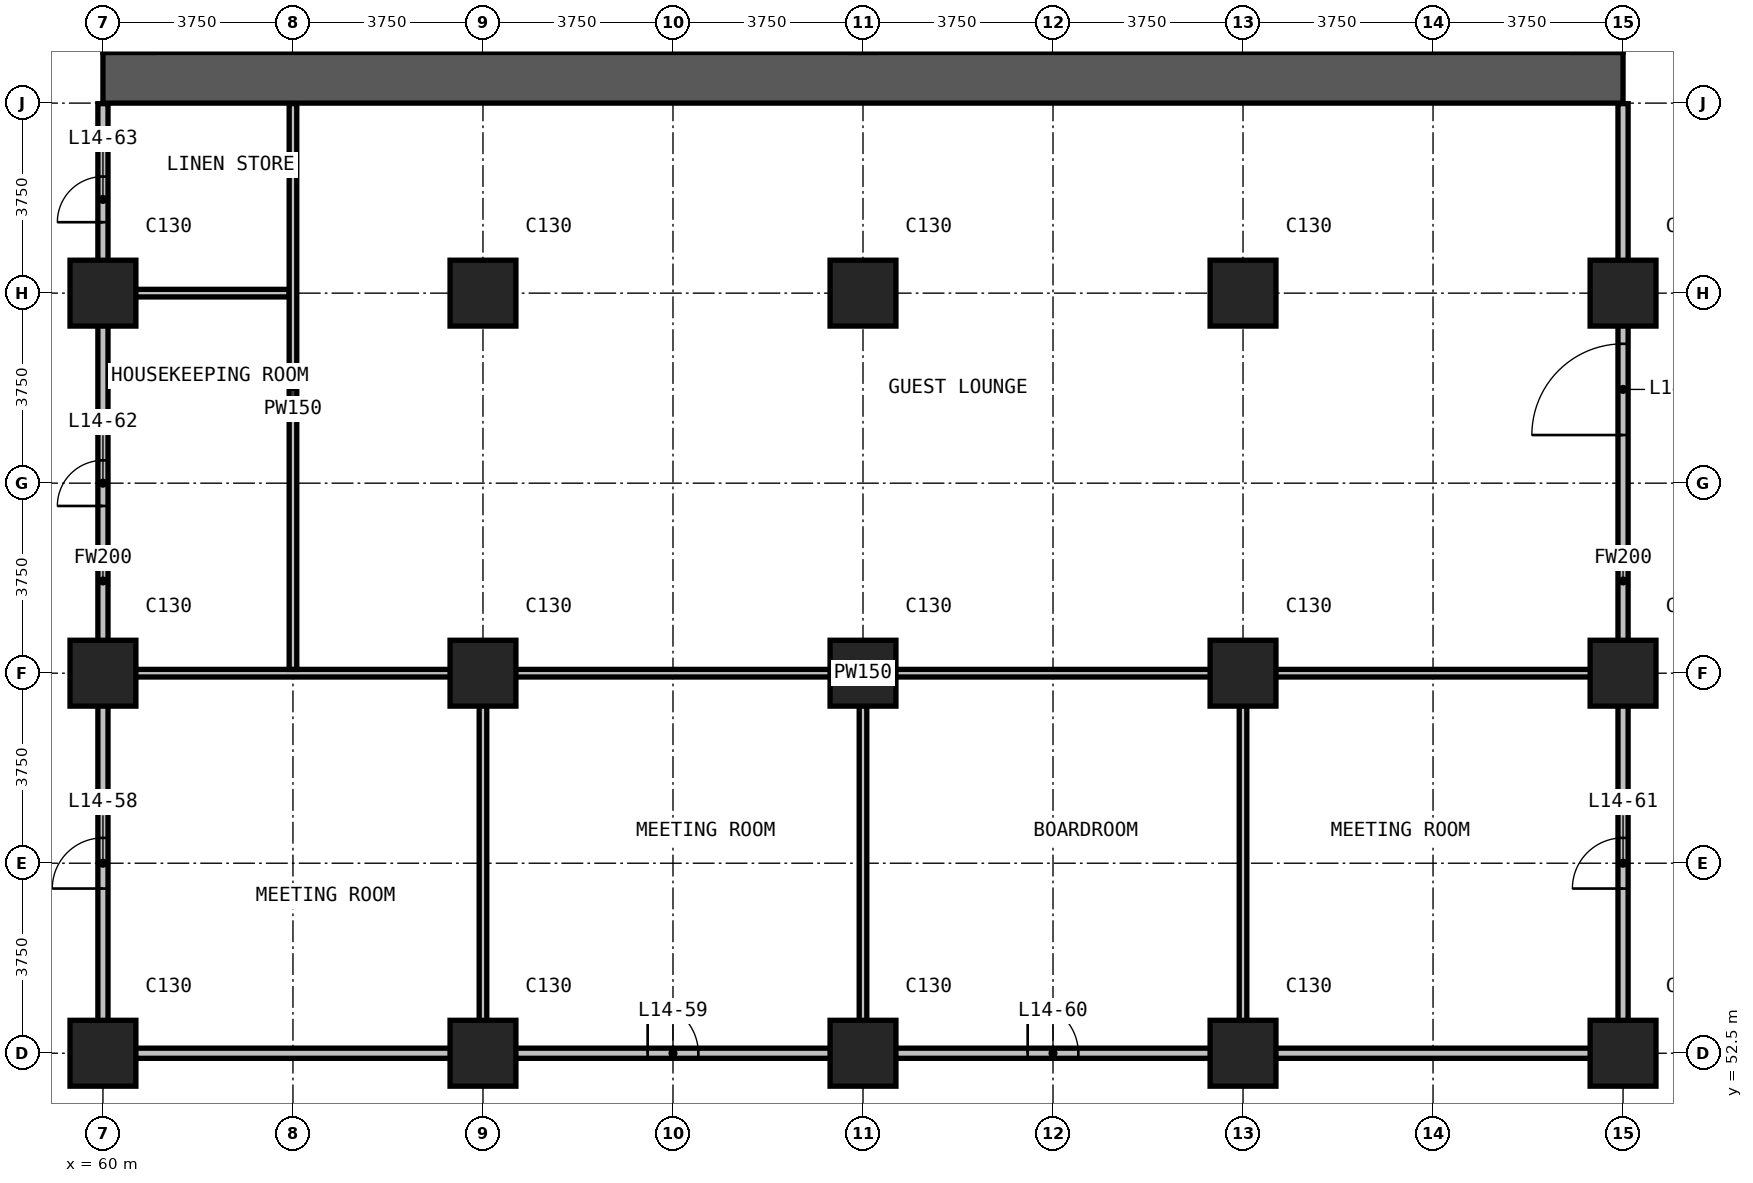
"""IFC4 building model, lengths in metres.
Left out: names, types, materials, properties, quantities, classifications, styles, units other than length and angle.
Written with IfcOpenShell. Run it as: python <this file> out.ifc"""

import sys

from ifc_helpers import new_model, si_unit, direction, frame, frame_2d, origin, origin_2d, place, context, subcontext, project, spatial, rectangle, extrude, element, fill, save


model = new_model("IFC4")
c1 = context("Model", 3, precision=1e-05, world=origin(), true_north=direction((0.0, 1.0)))
c2 = subcontext(c1, "Body", "Model", "MODEL_VIEW")
j1 = project(units=[si_unit("LENGTHUNIT", "METRE"), si_unit("PLANEANGLEUNIT", "RADIAN")], contexts=[c1])
p1 = place(None, origin())
s1 = spatial("IfcSite", under=j1, at=p1, CompositionType="ELEMENT")
p2 = place(p1, origin())
s2 = spatial("IfcBuilding", under=s1, at=p2, CompositionType="ELEMENT")
p3 = place(p2, frame((0.0, 0.0, 65.9)))
s3 = spatial("IfcBuildingStorey", under=s2, at=p3, CompositionType="ELEMENT", Elevation=65.9)
for number, where, z_axis, x_axis in (
    (1, (60.0, 52.5, 0.0), (0.0, 0.0, 1.0), (1.0, 0.0, 0.0)),
    (2, (60.0, 60.0, 0.0), (0.0, 0.0, 1.0), (1.0, 0.0, 0.0)),
    (3, (60.0, 67.5, 0.0), (0.0, 0.0, 1.0), (1.0, 0.0, 0.0)),
    (4, (67.5, 52.5, 0.0), (0.0, 0.0, 1.0), (1.0, 0.0, 0.0)),
    (5, (67.5, 60.0, 0.0), (0.0, 0.0, 1.0), (1.0, 0.0, 0.0)),
    (6, (67.5, 67.5, 0.0), (0.0, 0.0, 1.0), (1.0, 0.0, 0.0)),
    (7, (75.0, 52.5, 0.0), (0.0, 0.0, 1.0), (1.0, 0.0, 0.0)),
    (8, (75.0, 60.0, 0.0), (0.0, 0.0, 1.0), (1.0, 0.0, 0.0)),
    (9, (75.0, 67.5, 0.0), (0.0, 0.0, 1.0), (1.0, 0.0, 0.0)),
    (10, (82.5, 52.5, 0.0), (0.0, 0.0, 1.0), (1.0, 0.0, 0.0)),
    (11, (82.5, 60.0, 0.0), (0.0, 0.0, 1.0), (1.0, 0.0, 0.0)),
    (12, (82.5, 67.5, 0.0), (0.0, 0.0, 1.0), (1.0, 0.0, 0.0)),
    (13, (90.0, 52.5, 0.0), (0.0, 0.0, 1.0), (1.0, 0.0, 0.0)),
    (14, (90.0, 60.0, 0.0), (0.0, 0.0, 1.0), (1.0, 0.0, 0.0)),
    (15, (90.0, 67.5, 0.0), (0.0, 0.0, 1.0), (1.0, 0.0, 0.0)),
):
    element("IfcColumn", number, at=place(p3, frame(where, z_axis=z_axis, x_axis=x_axis)), inside=s3, PredefinedType="COLUMN", context=c2, shape_type="SweptSolid", body=[
        extrude(rectangle(XDim=1.3, YDim=1.3, at=origin_2d()), origin(), (0.0, 0.0, 1.0), 3.3),
    ])
p4 = place(p3, frame((60.0, 71.75, 0.0), z_axis=(0.0, 0.0, 1.0), x_axis=(1.0, 0.0, 0.0)))
e16 = element("IfcWall", 16, at=p4, inside=s3, PredefinedType="SHEAR", context=c2, shape_type="SweptSolid", body=[
    extrude(rectangle(XDim=30.0, YDim=1.0, at=frame_2d((15.0, 0.0))), origin(), (0.0, 0.0, 1.0), 3.3),
])
p5 = place(p3, frame((60.1, 52.5, 0.0), z_axis=(0.0, 0.0, 1.0), x_axis=(1.0, 0.0, 0.0)))
e17 = element("IfcWall", 17, at=p5, inside=s3, PredefinedType="PARTITIONING", context=c2, shape_type="SweptSolid", body=[
    extrude(rectangle(XDim=29.8, YDim=0.2, at=frame_2d((14.9, 0.0))), origin(), (0.0, 0.0, 1.0), 3.0),
])
p6 = place(p5, frame((10.65, 0.0, 0.0)))
e18 = element("IfcOpeningElement", 18, at=p6, cuts=e17, PredefinedType="OPENING", context=c2, shape_type="SweptSolid", body=[
    extrude(rectangle(XDim=1.0, YDim=2.2, at=frame_2d((0.5, 1.1))), frame((0.0, 0.11, 0.0), z_axis=(0.0, -1.0, 0.0), x_axis=(1.0, 0.0, 0.0)), (0.0, 0.0, 1.0), 0.22),
])
p7 = place(p5, frame((18.15, 0.0, 0.0)))
e19 = element("IfcOpeningElement", 19, at=p7, cuts=e17, PredefinedType="OPENING", context=c2, shape_type="SweptSolid", body=[
    extrude(rectangle(XDim=1.0, YDim=2.2, at=frame_2d((0.5, 1.1))), frame((0.0, 0.11, 0.0), z_axis=(0.0, -1.0, 0.0), x_axis=(1.0, 0.0, 0.0)), (0.0, 0.0, 1.0), 0.22),
])
p8 = place(p3, frame((60.0, 52.4, 0.0), z_axis=(0.0, 0.0, 1.0), x_axis=(0.0, 1.0, 0.0)))
e20 = element("IfcWall", 20, at=p8, inside=s3, PredefinedType="PARTITIONING", context=c2, shape_type="SweptSolid", body=[
    extrude(rectangle(XDim=18.84, YDim=0.2, at=frame_2d((9.42, 0.0))), origin(), (0.0, 0.0, 1.0), 3.0),
])
p9 = place(p8, frame((3.35, 0.0, 0.0)))
e21 = element("IfcOpeningElement", 21, at=p9, cuts=e20, PredefinedType="OPENING", context=c2, shape_type="SweptSolid", body=[
    extrude(rectangle(XDim=1.0, YDim=2.2, at=frame_2d((0.5, 1.1))), frame((0.0, 0.11, 0.0), z_axis=(0.0, -1.0, 0.0), x_axis=(1.0, 0.0, 0.0)), (0.0, 0.0, 1.0), 0.22),
])
p10 = place(p8, frame((10.9, 0.0, 0.0)))
e22 = element("IfcOpeningElement", 22, at=p10, cuts=e20, PredefinedType="OPENING", context=c2, shape_type="SweptSolid", body=[
    extrude(rectangle(XDim=0.9, YDim=2.2, at=frame_2d((0.45, 1.1))), frame((0.0, 0.11, 0.0), z_axis=(0.0, -1.0, 0.0), x_axis=(1.0, 0.0, 0.0)), (0.0, 0.0, 1.0), 0.22),
])
p11 = place(p8, frame((16.5, 0.0, 0.0)))
e23 = element("IfcOpeningElement", 23, at=p11, cuts=e20, PredefinedType="OPENING", context=c2, shape_type="SweptSolid", body=[
    extrude(rectangle(XDim=0.9, YDim=2.2, at=frame_2d((0.45, 1.1))), frame((0.0, 0.11, 0.0), z_axis=(0.0, -1.0, 0.0), x_axis=(1.0, 0.0, 0.0)), (0.0, 0.0, 1.0), 0.22),
])
p12 = place(p3, frame((90.0, 52.4, 0.0), z_axis=(0.0, 0.0, 1.0), x_axis=(0.0, 1.0, 0.0)))
e24 = element("IfcWall", 24, at=p12, inside=s3, PredefinedType="PARTITIONING", context=c2, shape_type="SweptSolid", body=[
    extrude(rectangle(XDim=18.84, YDim=0.2, at=frame_2d((9.42, 0.0))), origin(), (0.0, 0.0, 1.0), 3.0),
])
p13 = place(p12, frame((3.35, 0.0, 0.0)))
e25 = element("IfcOpeningElement", 25, at=p13, cuts=e24, PredefinedType="OPENING", context=c2, shape_type="SweptSolid", body=[
    extrude(rectangle(XDim=1.0, YDim=2.2, at=frame_2d((0.5, 1.1))), frame((0.0, 0.11, 0.0), z_axis=(0.0, -1.0, 0.0), x_axis=(1.0, 0.0, 0.0)), (0.0, 0.0, 1.0), 0.22),
])
p14 = place(p12, frame((12.3, 0.0, 0.0)))
e26 = element("IfcOpeningElement", 26, at=p14, cuts=e24, PredefinedType="OPENING", context=c2, shape_type="SweptSolid", body=[
    extrude(rectangle(XDim=1.8, YDim=2.2, at=frame_2d((0.9, 1.1))), frame((0.0, 0.11, 0.0), z_axis=(0.0, -1.0, 0.0), x_axis=(1.0, 0.0, 0.0)), (0.0, 0.0, 1.0), 0.22),
])
p15 = place(p3, frame((60.1, 60.0, 0.0), z_axis=(0.0, 0.0, 1.0), x_axis=(1.0, 0.0, 0.0)))
e27 = element("IfcWall", 27, at=p15, inside=s3, PredefinedType="PARTITIONING", context=c2, shape_type="SweptSolid", body=[
    extrude(rectangle(XDim=29.8, YDim=0.15, at=frame_2d((14.9, 0.0))), origin(), (0.0, 0.0, 1.0), 3.0),
])
p16 = place(p3, frame((60.1, 67.5, 0.0), z_axis=(0.0, 0.0, 1.0), x_axis=(1.0, 0.0, 0.0)))
e28 = element("IfcWall", 28, at=p16, inside=s3, PredefinedType="PARTITIONING", context=c2, shape_type="SweptSolid", body=[
    extrude(rectangle(XDim=3.575, YDim=0.15, at=frame_2d((1.788, 0.0))), origin(), (0.0, 0.0, 1.0), 3.0),
])
p17 = place(p3, frame((63.75, 60.075, 0.0), z_axis=(0.0, 0.0, 1.0), x_axis=(0.0, 1.0, 0.0)))
e29 = element("IfcWall", 29, at=p17, inside=s3, PredefinedType="PARTITIONING", context=c2, shape_type="SweptSolid", body=[
    extrude(rectangle(XDim=11.165, YDim=0.15, at=frame_2d((5.583, 0.0))), origin(), (0.0, 0.0, 1.0), 3.0),
])
for number, where, z_axis, x_axis in (
    (30, (67.5, 52.6, 0.0), (0.0, 0.0, 1.0), (0.0, 1.0, 0.0)),
    (31, (75.0, 52.6, 0.0), (0.0, 0.0, 1.0), (0.0, 1.0, 0.0)),
    (32, (82.5, 52.6, 0.0), (0.0, 0.0, 1.0), (0.0, 1.0, 0.0)),
):
    element("IfcWall", number, at=place(p3, frame(where, z_axis=z_axis, x_axis=x_axis)), inside=s3, PredefinedType="PARTITIONING", context=c2, shape_type="SweptSolid", body=[
        extrude(rectangle(XDim=7.325, YDim=0.15, at=frame_2d((3.663, 0.0))), origin(), (0.0, 0.0, 1.0), 3.0),
    ])
p18 = place(p9, origin())
e33 = element("IfcDoor", 33, at=p18, inside=s3, OperationType="SINGLE_SWING_LEFT", PredefinedType="DOOR", context=c2, shape_type="SweptSolid", body=[
    extrude(rectangle(XDim=1.0, YDim=2.2, at=frame_2d((0.5, 1.1))), frame((0.0, 0.025, 0.0), z_axis=(0.0, -1.0, 0.0), x_axis=(1.0, 0.0, 0.0)), (0.0, 0.0, 1.0), 0.05),
])
fill(e21, e33)
p19 = place(p6, origin())
e34 = element("IfcDoor", 34, at=p19, inside=s3, OperationType="SINGLE_SWING_LEFT", PredefinedType="DOOR", context=c2, shape_type="SweptSolid", body=[
    extrude(rectangle(XDim=1.0, YDim=2.2, at=frame_2d((0.5, 1.1))), frame((0.0, 0.025, 0.0), z_axis=(0.0, -1.0, 0.0), x_axis=(1.0, 0.0, 0.0)), (0.0, 0.0, 1.0), 0.05),
])
fill(e18, e34)
p20 = place(p7, origin())
e35 = element("IfcDoor", 35, at=p20, inside=s3, OperationType="SINGLE_SWING_RIGHT", PredefinedType="DOOR", context=c2, shape_type="SweptSolid", body=[
    extrude(rectangle(XDim=1.0, YDim=2.2, at=frame_2d((0.5, 1.1))), frame((0.0, 0.025, 0.0), z_axis=(0.0, -1.0, 0.0), x_axis=(1.0, 0.0, 0.0)), (0.0, 0.0, 1.0), 0.05),
])
fill(e19, e35)
p21 = place(p13, origin())
e36 = element("IfcDoor", 36, at=p21, inside=s3, OperationType="SINGLE_SWING_RIGHT", PredefinedType="DOOR", context=c2, shape_type="SweptSolid", body=[
    extrude(rectangle(XDim=1.0, YDim=2.2, at=frame_2d((0.5, 1.1))), frame((0.0, 0.025, 0.0), z_axis=(0.0, -1.0, 0.0), x_axis=(1.0, 0.0, 0.0)), (0.0, 0.0, 1.0), 0.05),
])
fill(e25, e36)
p22 = place(p10, origin())
e37 = element("IfcDoor", 37, at=p22, inside=s3, OperationType="SINGLE_SWING_LEFT", PredefinedType="DOOR", context=c2, shape_type="SweptSolid", body=[
    extrude(rectangle(XDim=0.9, YDim=2.2, at=frame_2d((0.45, 1.1))), frame((0.0, 0.025, 0.0), z_axis=(0.0, -1.0, 0.0), x_axis=(1.0, 0.0, 0.0)), (0.0, 0.0, 1.0), 0.05),
])
fill(e22, e37)
p23 = place(p11, origin())
e38 = element("IfcDoor", 38, at=p23, inside=s3, OperationType="SINGLE_SWING_LEFT", PredefinedType="DOOR", context=c2, shape_type="SweptSolid", body=[
    extrude(rectangle(XDim=0.9, YDim=2.2, at=frame_2d((0.45, 1.1))), frame((0.0, 0.025, 0.0), z_axis=(0.0, -1.0, 0.0), x_axis=(1.0, 0.0, 0.0)), (0.0, 0.0, 1.0), 0.05),
])
fill(e23, e38)
p24 = place(p14, origin())
e39 = element("IfcDoor", 39, at=p24, inside=s3, OperationType="DOUBLE_DOOR_SINGLE_SWING", PredefinedType="DOOR", context=c2, shape_type="SweptSolid", body=[
    extrude(rectangle(XDim=1.8, YDim=2.2, at=frame_2d((0.9, 1.1))), frame((0.0, 0.025, 0.0), z_axis=(0.0, -1.0, 0.0), x_axis=(1.0, 0.0, 0.0)), (0.0, 0.0, 1.0), 0.05),
])
fill(e26, e39)
save(model, sys.argv[1])
